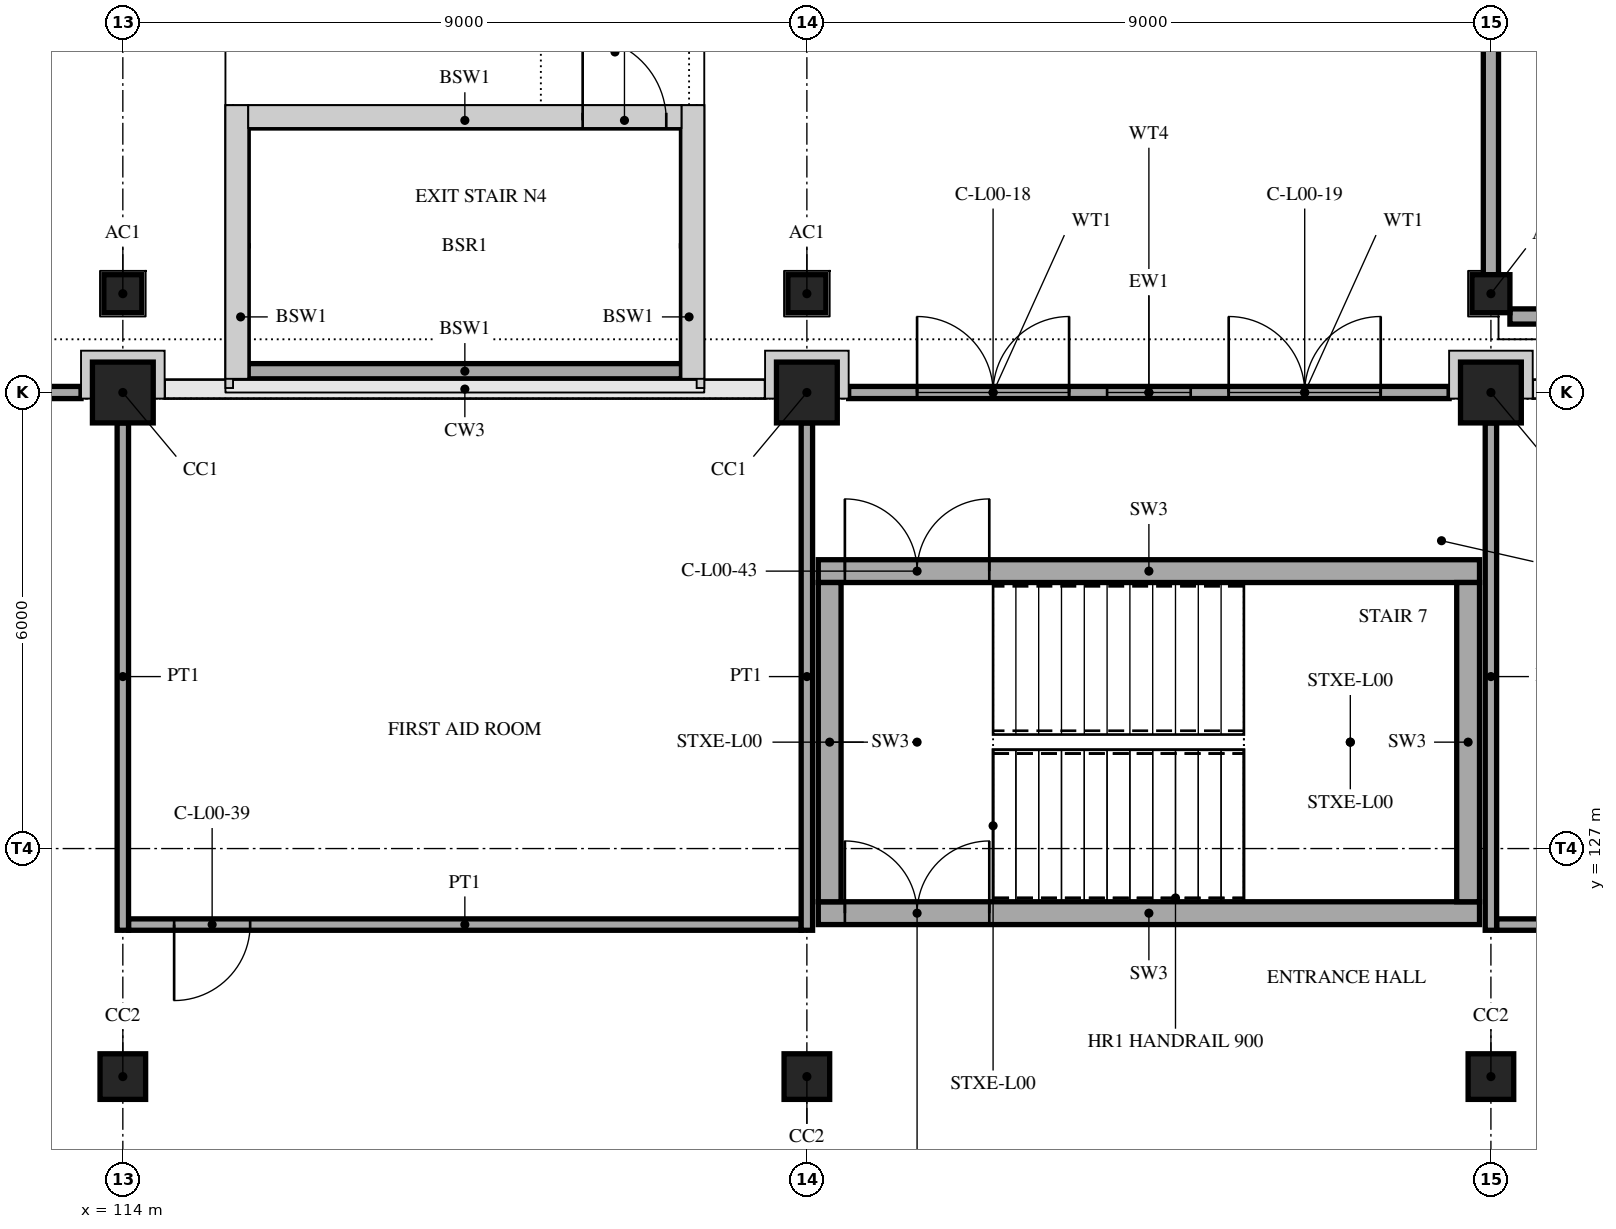
"""IFC4 building model, lengths in metres.
Left out: names, types, materials, properties, quantities, classifications, styles, units other than length and angle.
Written with IfcOpenShell. Run it as: python <this file> out.ifc"""

import sys

from ifc_helpers import new_model, si_unit, direction, frame, frame_2d, origin, origin_2d, place, context, subcontext, project, spatial, rectangle, extrude, element, fill, save


model = new_model("IFC4")
c1 = context("Model", 3, precision=1e-05, world=origin(), true_north=direction((0.0, 1.0)))
c2 = subcontext(c1, "Body", "Model", "MODEL_VIEW")
j1 = project(units=[si_unit("LENGTHUNIT", "METRE"), si_unit("PLANEANGLEUNIT", "RADIAN")], contexts=[c1])
p1 = place(None, origin())
s1 = spatial("IfcSite", under=j1, at=p1, CompositionType="ELEMENT")
p2 = place(p1, origin())
s2 = spatial("IfcBuilding", under=s1, at=p2, CompositionType="ELEMENT")
p3 = place(p2, origin())
s3 = spatial("IfcBuildingStorey", under=s2, at=p3, CompositionType="ELEMENT", Elevation=0.0)
p4 = place(p3, frame((114.0, 124.0, 0.0), z_axis=(0.0, 0.0, 1.0), x_axis=(1.0, 0.0, 0.0)))
e1 = element("IfcColumn", 1, at=p4, inside=s3, PredefinedType="COLUMN", context=c2, shape_type="SweptSolid", body=[
    extrude(rectangle(XDim=0.6, YDim=0.6, at=origin_2d()), origin(), (0.0, 0.0, 1.0), 5.0),
])
p5 = place(p3, frame((114.0, 133.0, 0.0), z_axis=(0.0, 0.0, 1.0), x_axis=(1.0, 0.0, 0.0)))
e2 = element("IfcColumn", 2, at=p5, inside=s3, PredefinedType="COLUMN", context=c2, shape_type="SweptSolid", body=[
    extrude(rectangle(XDim=0.8, YDim=0.8, at=origin_2d()), origin(), (0.0, 0.0, 1.0), 5.0),
])
p6 = place(p3, frame((123.0, 124.0, 0.0), z_axis=(0.0, 0.0, 1.0), x_axis=(1.0, 0.0, 0.0)))
e3 = element("IfcColumn", 3, at=p6, inside=s3, PredefinedType="COLUMN", context=c2, shape_type="SweptSolid", body=[
    extrude(rectangle(XDim=0.6, YDim=0.6, at=origin_2d()), origin(), (0.0, 0.0, 1.0), 5.0),
])
p7 = place(p3, frame((123.0, 133.0, 0.0), z_axis=(0.0, 0.0, 1.0), x_axis=(1.0, 0.0, 0.0)))
e4 = element("IfcColumn", 4, at=p7, inside=s3, PredefinedType="COLUMN", context=c2, shape_type="SweptSolid", body=[
    extrude(rectangle(XDim=0.8, YDim=0.8, at=origin_2d()), origin(), (0.0, 0.0, 1.0), 5.0),
])
p8 = place(p3, frame((132.0, 124.0, 0.0), z_axis=(0.0, 0.0, 1.0), x_axis=(1.0, 0.0, 0.0)))
e5 = element("IfcColumn", 5, at=p8, inside=s3, PredefinedType="COLUMN", context=c2, shape_type="SweptSolid", body=[
    extrude(rectangle(XDim=0.6, YDim=0.6, at=origin_2d()), origin(), (0.0, 0.0, 1.0), 5.0),
])
p9 = place(p3, frame((132.0, 133.0, 0.0), z_axis=(0.0, 0.0, 1.0), x_axis=(1.0, 0.0, 0.0)))
e6 = element("IfcColumn", 6, at=p9, inside=s3, PredefinedType="COLUMN", context=c2, shape_type="SweptSolid", body=[
    extrude(rectangle(XDim=0.8, YDim=0.8, at=origin_2d()), origin(), (0.0, 0.0, 1.0), 5.0),
])
p10 = place(p3, frame((123.15, 126.15, 0.0), z_axis=(0.0, 0.0, 1.0), x_axis=(1.0, 0.0, 0.0)))
e7 = element("IfcWall", 7, at=p10, inside=s3, PredefinedType="SHEAR", context=c2, shape_type="SweptSolid", body=[
    extrude(rectangle(XDim=8.7, YDim=0.3, at=frame_2d((4.35, 0.0))), origin(), (0.0, 0.0, 1.0), 5.0),
])
p11 = place(p10, frame((0.35, 0.0, 0.0)))
e8 = element("IfcOpeningElement", 8, at=p11, cuts=e7, PredefinedType="OPENING", context=c2, shape_type="SweptSolid", body=[
    extrude(rectangle(XDim=1.9, YDim=2.1, at=frame_2d((0.95, 1.05))), frame((0.0, 0.16, 0.0), z_axis=(0.0, -1.0, 0.0), x_axis=(1.0, 0.0, 0.0)), (0.0, 0.0, 1.0), 0.32),
])
p12 = place(p3, frame((123.15, 130.65, 0.0), z_axis=(0.0, 0.0, 1.0), x_axis=(1.0, 0.0, 0.0)))
e9 = element("IfcWall", 9, at=p12, inside=s3, PredefinedType="SHEAR", context=c2, shape_type="SweptSolid", body=[
    extrude(rectangle(XDim=8.7, YDim=0.3, at=frame_2d((4.35, 0.0))), origin(), (0.0, 0.0, 1.0), 5.0),
])
p13 = place(p12, frame((0.35, 0.0, 0.0)))
e10 = element("IfcOpeningElement", 10, at=p13, cuts=e9, PredefinedType="OPENING", context=c2, shape_type="SweptSolid", body=[
    extrude(rectangle(XDim=1.9, YDim=2.1, at=frame_2d((0.95, 1.05))), frame((0.0, 0.16, 0.0), z_axis=(0.0, -1.0, 0.0), x_axis=(1.0, 0.0, 0.0)), (0.0, 0.0, 1.0), 0.32),
])
for number, where, z_axis, x_axis in (
    (11, (123.3, 126.3, 0.0), (0.0, 0.0, 1.0), (0.0, 1.0, 0.0)),
    (12, (131.7, 126.3, 0.0), (0.0, 0.0, 1.0), (0.0, 1.0, 0.0)),
):
    element("IfcWall", number, at=place(p3, frame(where, z_axis=z_axis, x_axis=x_axis)), inside=s3, PredefinedType="SHEAR", context=c2, shape_type="SweptSolid", body=[
        extrude(rectangle(XDim=4.2, YDim=0.3, at=frame_2d((2.1, 0.0))), origin(), (0.0, 0.0, 1.0), 5.0),
    ])
p14 = place(p3, frame((121.45, 133.059, 0.0), z_axis=(0.0, 0.0, 1.0), x_axis=(0.0, 1.0, 0.0)))
e13 = element("IfcWall", 13, at=p14, inside=s3, PredefinedType="SOLIDWALL", context=c2, shape_type="SweptSolid", body=[
    extrude(rectangle(XDim=1.871, YDim=0.2, at=frame_2d((0.936, 0.0))), origin(), (0.0, 0.0, 1.0), 3.2),
])
p15 = place(p3, frame((121.45, 134.93, 0.0), z_axis=(0.0, 0.0, 1.0), x_axis=(0.0, 1.0, 0.0)))
e14 = element("IfcWall", 14, at=p15, inside=s3, PredefinedType="SOLIDWALL", context=c2, shape_type="SweptSolid", body=[
    extrude(rectangle(XDim=1.75, YDim=0.2, at=frame_2d((0.875, 0.0))), origin(), (0.0, 0.0, 1.0), 3.2),
])
p16 = place(p3, frame((115.55, 133.059, 0.0), z_axis=(0.0, 0.0, 1.0), x_axis=(0.0, 1.0, 0.0)))
e15 = element("IfcWall", 15, at=p16, inside=s3, PredefinedType="SOLIDWALL", context=c2, shape_type="SweptSolid", body=[
    extrude(rectangle(XDim=1.871, YDim=0.2, at=frame_2d((0.936, 0.0))), origin(), (0.0, 0.0, 1.0), 3.2),
])
p17 = place(p3, frame((115.55, 134.93, 0.0), z_axis=(0.0, 0.0, 1.0), x_axis=(0.0, 1.0, 0.0)))
e16 = element("IfcWall", 16, at=p17, inside=s3, PredefinedType="SOLIDWALL", context=c2, shape_type="SweptSolid", body=[
    extrude(rectangle(XDim=1.75, YDim=0.2, at=frame_2d((0.875, 0.0))), origin(), (0.0, 0.0, 1.0), 3.2),
])
p18 = place(p3, frame((121.35, 136.58, 0.0), z_axis=(0.0, 0.0, 1.0), x_axis=(-1.0, 0.0, 0.0)))
e17 = element("IfcWall", 17, at=p18, inside=s3, PredefinedType="SOLIDWALL", context=c2, shape_type="SweptSolid", body=[
    extrude(rectangle(XDim=5.7, YDim=0.2, at=frame_2d((2.85, 0.0))), origin(), (0.0, 0.0, 1.0), 3.2),
])
p19 = place(p18, frame((0.2, 0.0, 0.0)))
e18 = element("IfcOpeningElement", 18, at=p19, cuts=e17, PredefinedType="OPENING", context=c2, shape_type="SweptSolid", body=[
    extrude(rectangle(XDim=1.1, YDim=2.1, at=frame_2d((0.55, 1.05))), frame((0.0, 0.11, 0.0), z_axis=(0.0, -1.0, 0.0), x_axis=(1.0, 0.0, 0.0)), (0.0, 0.0, 1.0), 0.22),
])
p20 = place(p3, frame((121.35, 133.28, 0.0), z_axis=(0.0, 0.0, 1.0), x_axis=(-1.0, 0.0, 0.0)))
e19 = element("IfcWall", 19, at=p20, inside=s3, PredefinedType="SOLIDWALL", context=c2, shape_type="SweptSolid", body=[
    extrude(rectangle(XDim=5.7, YDim=0.2, at=frame_2d((2.85, 0.0))), origin(), (0.0, 0.0, 1.0), 3.2),
])
p21 = place(p3, frame((107.35, 133.0, 0.0), z_axis=(0.0, 0.0, 1.0), x_axis=(1.0, 0.0, 0.0)))
e20 = element("IfcWall", 20, at=p21, inside=s3, PredefinedType="STANDARD", context=c2, shape_type="SweptSolid", body=[
    extrude(rectangle(XDim=6.1, YDim=0.16, at=frame_2d((3.05, 0.0))), origin(), (0.0, 0.0, 1.0), 5.0),
])
p22 = place(p21, frame((0.9, 0.0, 0.0)))
e21 = element("IfcOpeningElement", 21, at=p22, cuts=e20, PredefinedType="OPENING", context=c2, shape_type="SweptSolid", body=[
    extrude(rectangle(XDim=2.0, YDim=2.4, at=frame_2d((1.0, 1.2))), frame((0.0, 0.09, 0.0), z_axis=(0.0, -1.0, 0.0), x_axis=(1.0, 0.0, 0.0)), (0.0, 0.0, 1.0), 0.18),
])
p23 = place(p21, frame((0.9, 0.0, 2.6)))
e22 = element("IfcOpeningElement", 22, at=p23, cuts=e20, PredefinedType="OPENING", context=c2, shape_type="SweptSolid", body=[
    extrude(rectangle(XDim=2.0, YDim=2.1, at=frame_2d((1.0, 1.05))), frame((0.0, 0.09, 0.0), z_axis=(0.0, -1.0, 0.0), x_axis=(1.0, 0.0, 0.0)), (0.0, 0.0, 1.0), 0.18),
])
p24 = place(p21, frame((3.2, 0.0, 0.0)))
e23 = element("IfcOpeningElement", 23, at=p24, cuts=e20, PredefinedType="OPENING", context=c2, shape_type="SweptSolid", body=[
    extrude(rectangle(XDim=2.0, YDim=2.4, at=frame_2d((1.0, 1.2))), frame((0.0, 0.09, 0.0), z_axis=(0.0, -1.0, 0.0), x_axis=(1.0, 0.0, 0.0)), (0.0, 0.0, 1.0), 0.18),
])
p25 = place(p21, frame((3.2, 0.0, 2.6)))
e24 = element("IfcOpeningElement", 24, at=p25, cuts=e20, PredefinedType="OPENING", context=c2, shape_type="SweptSolid", body=[
    extrude(rectangle(XDim=2.0, YDim=2.1, at=frame_2d((1.0, 1.05))), frame((0.0, 0.09, 0.0), z_axis=(0.0, -1.0, 0.0), x_axis=(1.0, 0.0, 0.0)), (0.0, 0.0, 1.0), 0.18),
])
p26 = place(p3, frame((123.55, 133.0, 0.0), z_axis=(0.0, 0.0, 1.0), x_axis=(1.0, 0.0, 0.0)))
e25 = element("IfcWall", 25, at=p26, inside=s3, PredefinedType="STANDARD", context=c2, shape_type="SweptSolid", body=[
    extrude(rectangle(XDim=7.9, YDim=0.16, at=frame_2d((3.95, 0.0))), origin(), (0.0, 0.0, 1.0), 5.0),
])
p27 = place(p26, frame((0.9, 0.0, 0.0)))
e26 = element("IfcOpeningElement", 26, at=p27, cuts=e25, PredefinedType="OPENING", context=c2, shape_type="SweptSolid", body=[
    extrude(rectangle(XDim=2.0, YDim=2.4, at=frame_2d((1.0, 1.2))), frame((0.0, 0.09, 0.0), z_axis=(0.0, -1.0, 0.0), x_axis=(1.0, 0.0, 0.0)), (0.0, 0.0, 1.0), 0.18),
])
p28 = place(p26, frame((0.9, 0.0, 2.6)))
e27 = element("IfcOpeningElement", 27, at=p28, cuts=e25, PredefinedType="OPENING", context=c2, shape_type="SweptSolid", body=[
    extrude(rectangle(XDim=2.0, YDim=2.1, at=frame_2d((1.0, 1.05))), frame((0.0, 0.09, 0.0), z_axis=(0.0, -1.0, 0.0), x_axis=(1.0, 0.0, 0.0)), (0.0, 0.0, 1.0), 0.18),
])
p29 = place(p26, frame((5.0, 0.0, 0.0)))
e28 = element("IfcOpeningElement", 28, at=p29, cuts=e25, PredefinedType="OPENING", context=c2, shape_type="SweptSolid", body=[
    extrude(rectangle(XDim=2.0, YDim=2.4, at=frame_2d((1.0, 1.2))), frame((0.0, 0.09, 0.0), z_axis=(0.0, -1.0, 0.0), x_axis=(1.0, 0.0, 0.0)), (0.0, 0.0, 1.0), 0.18),
])
p30 = place(p26, frame((5.0, 0.0, 2.6)))
e29 = element("IfcOpeningElement", 29, at=p30, cuts=e25, PredefinedType="OPENING", context=c2, shape_type="SweptSolid", body=[
    extrude(rectangle(XDim=2.0, YDim=2.1, at=frame_2d((1.0, 1.05))), frame((0.0, 0.09, 0.0), z_axis=(0.0, -1.0, 0.0), x_axis=(1.0, 0.0, 0.0)), (0.0, 0.0, 1.0), 0.18),
])
p31 = place(p26, frame((3.4, 0.0, 0.9)))
e30 = element("IfcOpeningElement", 30, at=p31, cuts=e25, PredefinedType="OPENING", context=c2, shape_type="SweptSolid", body=[
    extrude(rectangle(XDim=1.1, YDim=3.8, at=frame_2d((0.55, 1.9))), frame((0.0, 0.09, 0.0), z_axis=(0.0, -1.0, 0.0), x_axis=(1.0, 0.0, 0.0)), (0.0, 0.0, 1.0), 0.18),
])
for number, where, z_axis, x_axis in (
    (31, (114.0, 134.3, -0.2), (0.0, 0.0, 1.0), (1.0, 0.0, 0.0)),
    (32, (123.0, 134.3, -0.2), (0.0, 0.0, 1.0), (1.0, 0.0, 0.0)),
    (33, (132.0, 134.3, -0.2), (0.0, 0.0, 1.0), (1.0, 0.0, 0.0)),
):
    element("IfcColumn", number, at=place(p3, frame(where, z_axis=z_axis, x_axis=x_axis)), inside=s3, PredefinedType="COLUMN", context=c2, shape_type="SweptSolid", body=[
        extrude(rectangle(XDim=0.5, YDim=0.5, at=origin_2d()), origin(), (0.0, 0.0, 1.0), 4.95),
    ])
p32 = place(p3, frame((132.25, 134.0, 0.0), z_axis=(0.0, 0.0, 1.0), x_axis=(1.0, 0.0, 0.0)))
e34 = element("IfcWall", 34, at=p32, inside=s3, PredefinedType="STANDARD", context=c2, shape_type="SweptSolid", body=[
    extrude(rectangle(XDim=8.5, YDim=0.2, at=frame_2d((4.25, 0.0))), origin(), (0.0, 0.0, 1.0), 4.05),
])
p33 = place(p3, frame((132.0, 134.55, 0.0), z_axis=(0.0, 0.0, 1.0), x_axis=(0.0, 1.0, 0.0)))
e35 = element("IfcWall", 35, at=p33, inside=s3, PredefinedType="STANDARD", context=c2, shape_type="SweptSolid", body=[
    extrude(rectangle(XDim=6.37, YDim=0.2, at=frame_2d((3.185, 0.0))), origin(), (0.0, 0.0, 1.0), 3.75),
])
p34 = place(p3, frame((114.075, 126.0, 0.0), z_axis=(0.0, 0.0, 1.0), x_axis=(1.0, 0.0, 0.0)))
e36 = element("IfcWall", 36, at=p34, inside=s3, PredefinedType="PARTITIONING", context=c2, shape_type="SweptSolid", body=[
    extrude(rectangle(XDim=8.85, YDim=0.15, at=frame_2d((4.425, 0.0))), origin(), (0.0, 0.0, 1.0), 4.8),
])
p35 = place(p34, frame((0.6, 0.0, 0.0)))
e37 = element("IfcOpeningElement", 37, at=p35, cuts=e36, PredefinedType="OPENING", context=c2, shape_type="SweptSolid", body=[
    extrude(rectangle(XDim=1.0, YDim=2.1, at=frame_2d((0.5, 1.05))), frame((0.0, 0.085, 0.0), z_axis=(0.0, -1.0, 0.0), x_axis=(1.0, 0.0, 0.0)), (0.0, 0.0, 1.0), 0.17),
])
for number, where, z_axis, x_axis in (
    (38, (114.0, 125.925, 0.0), (0.0, 0.0, 1.0), (0.0, 1.0, 0.0)),
    (39, (123.0, 125.925, 0.0), (0.0, 0.0, 1.0), (0.0, 1.0, 0.0)),
):
    element("IfcWall", number, at=place(p3, frame(where, z_axis=z_axis, x_axis=x_axis)), inside=s3, PredefinedType="PARTITIONING", context=c2, shape_type="SweptSolid", body=[
        extrude(rectangle(XDim=6.675, YDim=0.15, at=frame_2d((3.337, 0.0))), origin(), (0.0, 0.0, 1.0), 4.0),
    ])
p36 = place(p3, frame((132.075, 126.0, 0.0), z_axis=(0.0, 0.0, 1.0), x_axis=(1.0, 0.0, 0.0)))
e40 = element("IfcWall", 40, at=p36, inside=s3, PredefinedType="PARTITIONING", context=c2, shape_type="SweptSolid", body=[
    extrude(rectangle(XDim=8.85, YDim=0.15, at=frame_2d((4.425, 0.0))), origin(), (0.0, 0.0, 1.0), 4.8),
])
p37 = place(p36, frame((0.6, 0.0, 0.0)))
e41 = element("IfcOpeningElement", 41, at=p37, cuts=e40, PredefinedType="OPENING", context=c2, shape_type="SweptSolid", body=[
    extrude(rectangle(XDim=1.0, YDim=2.1, at=frame_2d((0.5, 1.05))), frame((0.0, 0.085, 0.0), z_axis=(0.0, -1.0, 0.0), x_axis=(1.0, 0.0, 0.0)), (0.0, 0.0, 1.0), 0.17),
])
p38 = place(p3, frame((132.0, 125.925, 0.0), z_axis=(0.0, 0.0, 1.0), x_axis=(0.0, 1.0, 0.0)))
e42 = element("IfcWall", 42, at=p38, inside=s3, PredefinedType="PARTITIONING", context=c2, shape_type="SweptSolid", body=[
    extrude(rectangle(XDim=6.675, YDim=0.15, at=frame_2d((3.337, 0.0))), origin(), (0.0, 0.0, 1.0), 4.0),
])
p39 = place(p19, frame((1.1, 0.0, 0.0), z_axis=(0.0, 0.0, 1.0), x_axis=(-1.0, 0.0, 0.0)))
e43 = element("IfcDoor", 43, at=p39, inside=s3, OperationType="SINGLE_SWING_LEFT", PredefinedType="DOOR", context=c2, shape_type="SweptSolid", body=[
    extrude(rectangle(XDim=1.1, YDim=2.1, at=frame_2d((0.55, 1.05))), frame((0.0, 0.025, 0.0), z_axis=(0.0, -1.0, 0.0), x_axis=(1.0, 0.0, 0.0)), (0.0, 0.0, 1.0), 0.05),
])
fill(e18, e43)
p40 = place(p27, origin())
e44 = element("IfcDoor", 44, at=p40, inside=s3, OperationType="DOUBLE_DOOR_SINGLE_SWING", PredefinedType="NOTDEFINED", context=c2, shape_type="SweptSolid", body=[
    extrude(rectangle(XDim=2.0, YDim=2.4, at=frame_2d((1.0, 1.2))), frame((0.0, 0.025, 0.0), z_axis=(0.0, -1.0, 0.0), x_axis=(1.0, 0.0, 0.0)), (0.0, 0.0, 1.0), 0.05),
])
fill(e26, e44)
p41 = place(p28, origin())
e45 = element("IfcWindow", 45, at=p41, inside=s3, PartitioningType="SINGLE_PANEL", PredefinedType="WINDOW", context=c2, shape_type="SweptSolid", body=[
    extrude(rectangle(XDim=2.0, YDim=2.1, at=frame_2d((1.0, 1.05))), frame((0.0, 0.03, 0.0), z_axis=(0.0, -1.0, 0.0), x_axis=(1.0, 0.0, 0.0)), (0.0, 0.0, 1.0), 0.06),
])
fill(e27, e45)
p42 = place(p29, origin())
e46 = element("IfcDoor", 46, at=p42, inside=s3, OperationType="DOUBLE_DOOR_SINGLE_SWING", PredefinedType="NOTDEFINED", context=c2, shape_type="SweptSolid", body=[
    extrude(rectangle(XDim=2.0, YDim=2.4, at=frame_2d((1.0, 1.2))), frame((0.0, 0.025, 0.0), z_axis=(0.0, -1.0, 0.0), x_axis=(1.0, 0.0, 0.0)), (0.0, 0.0, 1.0), 0.05),
])
fill(e28, e46)
p43 = place(p30, origin())
e47 = element("IfcWindow", 47, at=p43, inside=s3, PartitioningType="SINGLE_PANEL", PredefinedType="WINDOW", context=c2, shape_type="SweptSolid", body=[
    extrude(rectangle(XDim=2.0, YDim=2.1, at=frame_2d((1.0, 1.05))), frame((0.0, 0.03, 0.0), z_axis=(0.0, -1.0, 0.0), x_axis=(1.0, 0.0, 0.0)), (0.0, 0.0, 1.0), 0.06),
])
fill(e29, e47)
p44 = place(p31, origin())
e48 = element("IfcWindow", 48, at=p44, inside=s3, PartitioningType="SINGLE_PANEL", PredefinedType="WINDOW", context=c2, shape_type="SweptSolid", body=[
    extrude(rectangle(XDim=1.1, YDim=3.8, at=frame_2d((0.55, 1.9))), frame((0.0, 0.03, 0.0), z_axis=(0.0, -1.0, 0.0), x_axis=(1.0, 0.0, 0.0)), (0.0, 0.0, 1.0), 0.06),
])
fill(e30, e48)
p45 = place(p11, origin())
e49 = element("IfcDoor", 49, at=p45, inside=s3, OperationType="DOUBLE_DOOR_SINGLE_SWING", PredefinedType="NOTDEFINED", context=c2, shape_type="SweptSolid", body=[
    extrude(rectangle(XDim=1.9, YDim=2.1, at=frame_2d((0.95, 1.05))), frame((0.0, 0.025, 0.0), z_axis=(0.0, -1.0, 0.0), x_axis=(1.0, 0.0, 0.0)), (0.0, 0.0, 1.0), 0.05),
])
fill(e8, e49)
p46 = place(p35, frame((1.0, 0.0, 0.0), z_axis=(0.0, 0.0, 1.0), x_axis=(-1.0, 0.0, 0.0)))
e50 = element("IfcDoor", 50, at=p46, inside=s3, OperationType="SINGLE_SWING_RIGHT", PredefinedType="NOTDEFINED", context=c2, shape_type="SweptSolid", body=[
    extrude(rectangle(XDim=1.0, YDim=2.1, at=frame_2d((0.5, 1.05))), frame((0.0, 0.025, 0.0), z_axis=(0.0, -1.0, 0.0), x_axis=(1.0, 0.0, 0.0)), (0.0, 0.0, 1.0), 0.05),
])
fill(e37, e50)
p47 = place(p13, origin())
e51 = element("IfcDoor", 51, at=p47, inside=s3, OperationType="DOUBLE_DOOR_SINGLE_SWING", PredefinedType="NOTDEFINED", context=c2, shape_type="SweptSolid", body=[
    extrude(rectangle(XDim=1.9, YDim=2.1, at=frame_2d((0.95, 1.05))), frame((0.0, 0.025, 0.0), z_axis=(0.0, -1.0, 0.0), x_axis=(1.0, 0.0, 0.0)), (0.0, 0.0, 1.0), 0.05),
])
fill(e10, e51)
save(model, sys.argv[1])
